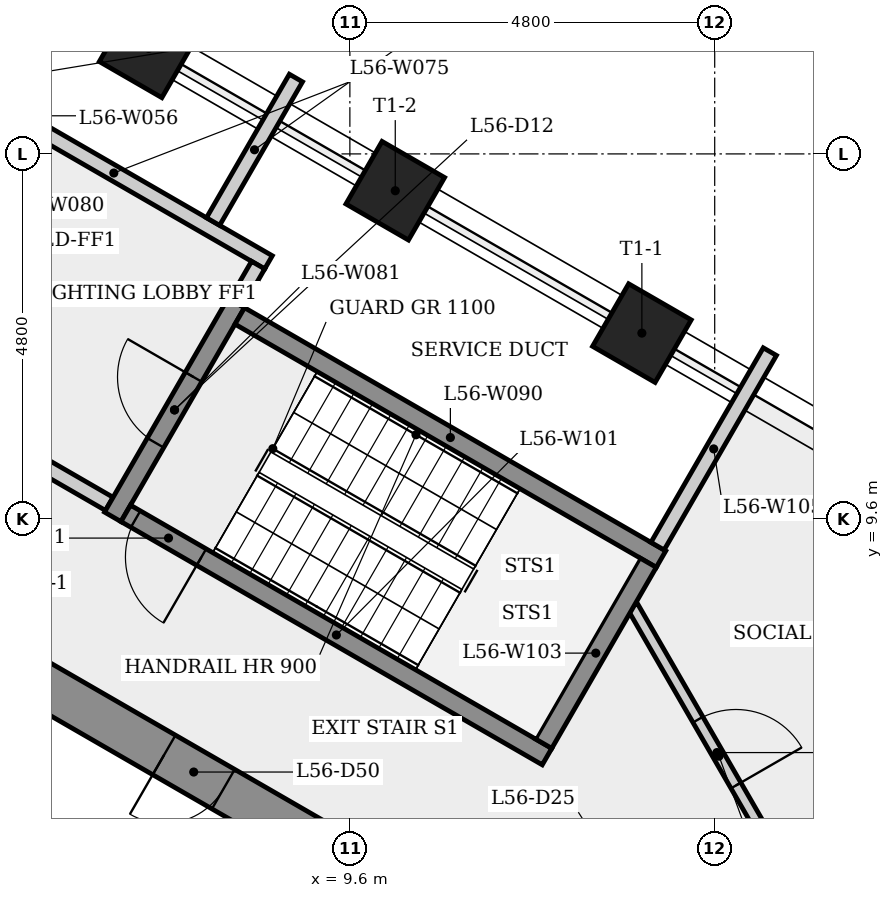
"""IFC4 building model, lengths in metres.
Left out: names, types, materials, properties, quantities, classifications, styles, units other than length and angle.
Written with IfcOpenShell. Run it as: python <this file> out.ifc"""

import sys

from ifc_helpers import new_model, si_unit, direction, frame, frame_2d, origin, origin_2d, place, context, subcontext, project, spatial, rectangle, extrude, element, fill, save


model = new_model("IFC4")
c1 = context("Model", 3, precision=1e-05, world=origin(), true_north=direction((0.0, 1.0)))
c2 = subcontext(c1, "Body", "Model", "MODEL_VIEW")
j1 = project(units=[si_unit("LENGTHUNIT", "METRE"), si_unit("PLANEANGLEUNIT", "RADIAN")], contexts=[c1])
p1 = place(None, origin())
s1 = spatial("IfcSite", under=j1, at=p1, CompositionType="ELEMENT")
p2 = place(p1, origin())
s2 = spatial("IfcBuilding", under=s1, at=p2, CompositionType="ELEMENT")
p3 = place(p2, frame((0.0, 0.0, 210.1)))
s3 = spatial("IfcBuildingStorey", under=s2, at=p3, CompositionType="ELEMENT", Elevation=210.1)
p4 = place(p3, frame((9.35, 5.225, 0.0), z_axis=(0.0, 0.0, 1.0), x_axis=(-0.866023993627, 0.500002442456, 0.0)))
e1 = element("IfcWall", 1, at=p4, inside=s3, PredefinedType="SHEAR", context=c2, shape_type="SweptSolid", body=[
    extrude(rectangle(XDim=10.97, YDim=0.6, at=frame_2d((5.485, 0.0))), origin(), (0.0, 0.0, 1.0), 4.0),
])
p5 = place(p4, frame((8.442, 0.0, 0.0)))
e2 = element("IfcOpeningElement", 2, at=p5, cuts=e1, PredefinedType="OPENING", context=c2, shape_type="SweptSolid", body=[
    extrude(rectangle(XDim=0.9, YDim=2.1, at=frame_2d((0.45, 1.05))), frame((0.0, 0.31, 0.0), z_axis=(0.0, -1.0, 0.0), x_axis=(1.0, 0.0, 0.0)), (0.0, 0.0, 1.0), 0.62),
])
p6 = place(p4, frame((1.634, 0.0, 0.0)))
e3 = element("IfcOpeningElement", 3, at=p6, cuts=e1, PredefinedType="OPENING", context=c2, shape_type="SweptSolid", body=[
    extrude(rectangle(XDim=0.9, YDim=2.1, at=frame_2d((0.45, 1.05))), frame((0.0, 0.31, 0.0), z_axis=(0.0, -1.0, 0.0), x_axis=(1.0, 0.0, 0.0)), (0.0, 0.0, 1.0), 0.62),
])
for number, where, z_axis, x_axis in (
    (4, (13.442, 12.042, 0.0), (0.0, 0.0, 1.0), (0.5, 0.866, 0.0)),
    (5, (10.197, 13.916, 0.0), (0.0, 0.0, 1.0), (0.5, 0.866, 0.0)),
    (6, (6.953, 15.789, 0.0), (0.0, 0.0, 1.0), (0.5, 0.866, 0.0)),
):
    element("IfcColumn", number, at=place(p3, frame(where, z_axis=z_axis, x_axis=x_axis)), inside=s3, PredefinedType="COLUMN", context=c2, shape_type="SweptSolid", body=[
        extrude(rectangle(XDim=0.95, YDim=0.95, at=origin_2d()), origin(), (0.0, 0.0, 1.0), 4.0),
    ])
p7 = place(p3, frame((4.459, 15.323, 0.0), z_axis=(0.0, 0.0, 1.0), x_axis=(0.866016039709, -0.500016218704, 0.0)))
e7 = element("IfcWall", 7, at=p7, inside=s3, PredefinedType="PLUMBINGWALL", context=c2, shape_type="SweptSolid", body=[
    extrude(rectangle(XDim=4.7, YDim=0.2, at=frame_2d((2.35, 0.0))), origin(), (0.0, 0.0, 1.0), 3.6),
])
p8 = place(p3, frame((6.435, 9.795, 0.0), z_axis=(0.0, 0.0, 1.0), x_axis=(-0.866012907634, 0.500021643343, 0.0)))
e8 = element("IfcWall", 8, at=p8, inside=s3, PredefinedType="PARTITIONING", context=c2, shape_type="SweptSolid", body=[
    extrude(rectangle(XDim=4.45, YDim=0.2, at=frame_2d((2.225, 0.0))), origin(), (0.0, 0.0, 1.0), 3.6),
])
p9 = place(p8, frame((1.675, 0.0, 0.0)))
e9 = element("IfcOpeningElement", 9, at=p9, cuts=e8, PredefinedType="OPENING", context=c2, shape_type="SweptSolid", body=[
    extrude(rectangle(XDim=1.1, YDim=2.1, at=frame_2d((0.55, 1.05))), frame((0.0, 0.11, 0.0), z_axis=(0.0, -1.0, 0.0), x_axis=(1.0, 0.0, 0.0)), (0.0, 0.0, 1.0), 0.22),
])
p10 = place(p3, frame((6.48, 9.624, 0.0), z_axis=(0.0, 0.0, 1.0), x_axis=(0.500017246033, 0.866015446554, 0.0)))
e10 = element("IfcWall", 10, at=p10, inside=s3, PredefinedType="SHEAR", context=c2, shape_type="SweptSolid", body=[
    extrude(rectangle(XDim=3.25, YDim=0.25, at=frame_2d((1.625, 0.0))), origin(), (0.0, 0.0, 1.0), 3.6),
])
p11 = place(p10, frame((1.125, 0.0, 0.0)))
e11 = element("IfcOpeningElement", 11, at=p11, cuts=e10, PredefinedType="OPENING", context=c2, shape_type="SweptSolid", body=[
    extrude(rectangle(XDim=1.0, YDim=2.1, at=frame_2d((0.5, 1.05))), frame((0.0, 0.135, 0.0), z_axis=(0.0, -1.0, 0.0), x_axis=(1.0, 0.0, 0.0)), (0.0, 0.0, 1.0), 0.27),
])
p12 = place(p3, frame((7.8, 13.51, 0.0), z_axis=(0.0, 0.0, 1.0), x_axis=(0.500016430238, 0.866015917575, 0.0)))
e12 = element("IfcWall", 12, at=p12, inside=s3, PredefinedType="PLUMBINGWALL", context=c2, shape_type="SweptSolid", body=[
    extrude(rectangle(XDim=2.181, YDim=0.2, at=frame_2d((1.09, 0.0))), origin(), (0.0, 0.0, 1.0), 3.6),
])
p13 = place(p3, frame((8.151, 12.268, 0.0), z_axis=(0.0, 0.0, 1.0), x_axis=(0.866025499775, -0.499999833739, 0.0)))
e13 = element("IfcWall", 13, at=p13, inside=s3, PredefinedType="SHEAR", context=c2, shape_type="SweptSolid", body=[
    extrude(rectangle(XDim=6.4, YDim=0.25, at=frame_2d((3.2, 0.0))), origin(), (0.0, 0.0, 1.0), 3.6),
])
p14 = place(p3, frame((8.393, 12.937, 0.0), z_axis=(0.0, 0.0, 1.0), x_axis=(-0.500065409566, -0.86598763626, 0.0)))
e14 = element("IfcWall", 14, at=p14, inside=s3, PredefinedType="PLUMBINGWALL", context=c2, shape_type="SweptSolid", body=[
    extrude(rectangle(XDim=0.575, YDim=0.2, at=frame_2d((0.288, 0.0))), origin(), (0.0, 0.0, 1.0), 3.6),
])
p15 = place(p3, frame((12.194, 6.47, 0.0), z_axis=(0.0, 0.0, 1.0), x_axis=(-0.866025499775, 0.499999833739, 0.0)))
e15 = element("IfcWall", 15, at=p15, inside=s3, PredefinedType="SHEAR", context=c2, shape_type="SweptSolid", body=[
    extrude(rectangle(XDim=6.4, YDim=0.25, at=frame_2d((3.2, 0.0))), origin(), (0.0, 0.0, 1.0), 3.6),
])
p16 = place(p15, frame((5.25, 0.0, 0.0)))
e16 = element("IfcOpeningElement", 16, at=p16, cuts=e15, PredefinedType="OPENING", context=c2, shape_type="SweptSolid", body=[
    extrude(rectangle(XDim=1.0, YDim=2.1, at=frame_2d((0.5, 1.05))), frame((0.0, 0.135, 0.0), z_axis=(0.0, -1.0, 0.0), x_axis=(1.0, 0.0, 0.0)), (0.0, 0.0, 1.0), 0.27),
])
p17 = place(p3, frame((13.317, 8.449, 0.0), z_axis=(0.0, 0.0, 1.0), x_axis=(0.500033079325, -0.866006304585, 0.0)))
e17 = element("IfcWall", 17, at=p17, inside=s3, PredefinedType="PARTITIONING", context=c2, shape_type="SweptSolid", body=[
    extrude(rectangle(XDim=4.558, YDim=0.15, at=frame_2d((2.279, 0.0))), origin(), (0.0, 0.0, 1.0), 3.6),
])
p18 = place(p17, frame((1.724, 0.0, 0.0)))
e18 = element("IfcOpeningElement", 18, at=p18, cuts=e17, PredefinedType="OPENING", context=c2, shape_type="SweptSolid", body=[
    extrude(rectangle(XDim=1.0, YDim=2.1, at=frame_2d((0.5, 1.05))), frame((0.0, 0.085, 0.0), z_axis=(0.0, -1.0, 0.0), x_axis=(1.0, 0.0, 0.0)), (0.0, 0.0, 1.0), 0.17),
])
p19 = place(p3, frame((12.148, 6.641, 0.0), z_axis=(0.0, 0.0, 1.0), x_axis=(0.500034990121, 0.866005201286, 0.0)))
e19 = element("IfcWall", 19, at=p19, inside=s3, PredefinedType="SHEAR", context=c2, shape_type="SweptSolid", body=[
    extrude(rectangle(XDim=2.75, YDim=0.25, at=frame_2d((1.375, 0.0))), origin(), (0.0, 0.0, 1.0), 3.6),
])
p20 = place(p3, frame((15.126, 11.799, 0.0), z_axis=(0.0, 0.0, 1.0), x_axis=(-0.499967936676, -0.866043914762, 0.0)))
e20 = element("IfcWall", 20, at=p20, inside=s3, PredefinedType="PLUMBINGWALL", context=c2, shape_type="SweptSolid", body=[
    extrude(rectangle(XDim=2.956, YDim=0.2, at=frame_2d((1.478, 0.0))), origin(), (0.0, 0.0, 1.0), 3.6),
])
p21 = place(p16, origin())
e21 = element("IfcDoor", 21, at=p21, inside=s3, OperationType="SINGLE_SWING_LEFT", PredefinedType="DOOR", context=c2, shape_type="SweptSolid", body=[
    extrude(rectangle(XDim=1.0, YDim=2.1, at=frame_2d((0.5, 1.05))), frame((0.0, 0.025, 0.0), z_axis=(0.0, -1.0, 0.0), x_axis=(1.0, 0.0, 0.0)), (0.0, 0.0, 1.0), 0.05),
])
fill(e16, e21)
p22 = place(p11, origin())
e22 = element("IfcDoor", 22, at=p22, inside=s3, OperationType="SINGLE_SWING_RIGHT", PredefinedType="DOOR", context=c2, shape_type="SweptSolid", body=[
    extrude(rectangle(XDim=1.0, YDim=2.1, at=frame_2d((0.5, 1.05))), frame((0.0, 0.025, 0.0), z_axis=(0.0, -1.0, 0.0), x_axis=(1.0, 0.0, 0.0)), (0.0, 0.0, 1.0), 0.05),
])
fill(e11, e22)
p23 = place(p18, origin())
e23 = element("IfcDoor", 23, at=p23, inside=s3, OperationType="SINGLE_SWING_RIGHT", PredefinedType="DOOR", context=c2, shape_type="SweptSolid", body=[
    extrude(rectangle(XDim=1.0, YDim=2.1, at=frame_2d((0.5, 1.05))), frame((0.0, 0.025, 0.0), z_axis=(0.0, -1.0, 0.0), x_axis=(1.0, 0.0, 0.0)), (0.0, 0.0, 1.0), 0.05),
])
fill(e18, e23)
p24 = place(p6, origin())
e24 = element("IfcDoor", 24, at=p24, inside=s3, OperationType="SINGLE_SWING_RIGHT", PredefinedType="DOOR", context=c2, shape_type="SweptSolid", body=[
    extrude(rectangle(XDim=0.9, YDim=2.1, at=frame_2d((0.45, 1.05))), frame((0.0, 0.025, 0.0), z_axis=(0.0, -1.0, 0.0), x_axis=(1.0, 0.0, 0.0)), (0.0, 0.0, 1.0), 0.05),
])
fill(e3, e24)
save(model, sys.argv[1])
